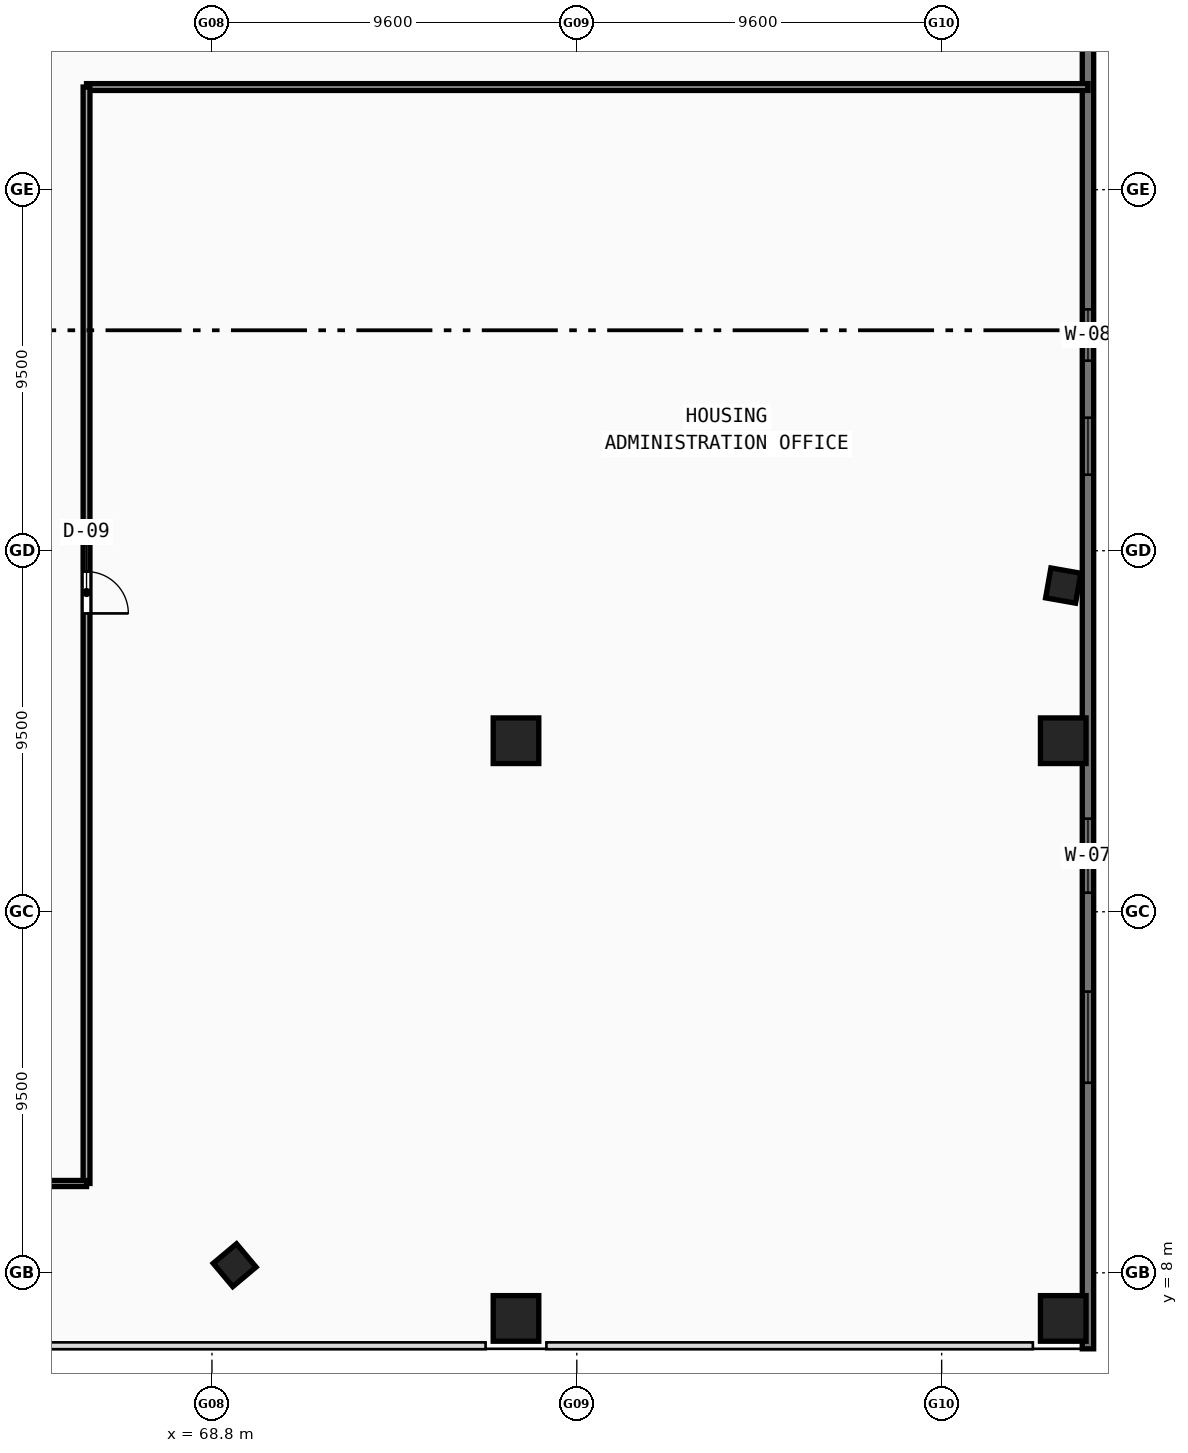
"""IFC4 building model, lengths in metres.
Left out: names, types, materials, properties, quantities, classifications, styles, units other than length and angle.
Written with IfcOpenShell. Run it as: python <this file> out.ifc"""

import sys

from ifc_helpers import new_model, si_unit, direction, frame, frame_2d, origin, origin_with_axes, origin_2d, place, context, subcontext, project, spatial, rectangle, hollow_rectangle, extrude, source, transform, mapped, element, fill, save


model = new_model("IFC4")
c1 = context("Model", 3, precision=1e-05, world=origin(), true_north=direction((0.0, 1.0)))
c2 = subcontext(c1, "Body", "Model", "MODEL_VIEW")
j1 = project(units=[si_unit("LENGTHUNIT", "METRE"), si_unit("PLANEANGLEUNIT", "RADIAN")], contexts=[c1])
p1 = place(None, origin())
s1 = spatial("IfcSite", under=j1, at=p1, CompositionType="ELEMENT")
p2 = place(p1, origin())
s2 = spatial("IfcBuilding", under=s1, at=p2, CompositionType="ELEMENT")
p3 = place(p2, frame((0.0, 0.0, 14.4)))
s3 = spatial("IfcBuildingStorey", under=s2, at=p3, CompositionType="ELEMENT", Elevation=14.4)
m1 = source(origin(), c2, "Body", "SweptSolid", [
    extrude(hollow_rectangle(XDim=1.2, YDim=1.2, WallThickness=0.05, at=origin_2d()), origin(), (0.0, 0.0, 1.0), 4.8),
])
for number, where, z_axis, x_axis in (
    (1, (76.8, 6.8, -0.28), (0.0, 0.0, 1.0), (1.0, 0.0, 0.0)),
    (2, (76.8, 22.0, -0.28), (0.0, 0.0, 1.0), (1.0, 0.0, 0.0)),
    (3, (91.2, 6.8, -0.28), (0.0, 0.0, 1.0), (1.0, 0.0, 0.0)),
    (4, (91.2, 22.0, -0.28), (0.0, 0.0, 1.0), (1.0, 0.0, 0.0)),
):
    element("IfcColumn", number, at=place(p3, frame(where, z_axis=z_axis, x_axis=x_axis)), inside=s3, PredefinedType="COLUMN", context=c2, shape_type="MappedRepresentation", body=[
        mapped(m1, transform((0.0, 0.0, 0.0), scale=1.0)),
    ])
m2 = source(origin(), c2, "Body", "SweptSolid", [
    extrude(hollow_rectangle(XDim=0.8, YDim=0.8, WallThickness=0.032, at=origin_2d()), origin(), (0.0, 0.0, 1.0), 4.8),
])
for number, where, z_axis, x_axis in (
    (5, (69.397, 8.2, -0.28), (0.0, 0.0, 1.0), (0.766, 0.643, 0.0)),
    (6, (91.199, 26.083, -0.28), (0.0, 0.0, 1.0), (0.174, 0.985, 0.0)),
):
    element("IfcColumn", number, at=place(p3, frame(where, z_axis=z_axis, x_axis=x_axis)), inside=s3, PredefinedType="COLUMN", context=c2, shape_type="MappedRepresentation", body=[
        mapped(m2, transform((0.0, 0.0, 0.0), scale=1.0)),
    ])
p4 = place(p3, frame((91.85, 6.0, 0.0), z_axis=(0.0, 0.0, 1.0), x_axis=(0.0, 1.0, 0.0)))
e7 = element("IfcWall", 7, at=p4, inside=s3, PredefinedType="STANDARD", context=c2, shape_type="SweptSolid", body=[
    extrude(rectangle(XDim=76.0, YDim=0.3, at=frame_2d((38.0, 0.0))), origin(), (0.0, 0.0, 1.0), 4.52),
])
p5 = place(p4, frame((7.0, 0.0, 0.9)))
e8 = element("IfcOpeningElement", 8, at=p5, cuts=e7, PredefinedType="OPENING", context=c2, shape_type="SweptSolid", body=[
    extrude(rectangle(XDim=2.4, YDim=1.8, at=frame_2d((1.2, 0.9))), frame((0.0, 0.16, 0.0), z_axis=(0.0, -1.0, 0.0), x_axis=(1.0, 0.0, 0.0)), (0.0, 0.0, 1.0), 0.32),
])
p6 = place(p4, frame((23.0, 0.0, 0.9)))
e9 = element("IfcOpeningElement", 9, at=p6, cuts=e7, PredefinedType="OPENING", context=c2, shape_type="SweptSolid", body=[
    extrude(rectangle(XDim=1.5, YDim=1.6, at=frame_2d((0.75, 0.8))), frame((0.0, 0.16, 0.0), z_axis=(0.0, -1.0, 0.0), x_axis=(1.0, 0.0, 0.0)), (0.0, 0.0, 1.0), 0.32),
])
p7 = place(p4, frame((43.0, 0.0, 0.9)))
e10 = element("IfcOpeningElement", 10, at=p7, cuts=e7, PredefinedType="OPENING", context=c2, shape_type="SweptSolid", body=[
    extrude(rectangle(XDim=2.4, YDim=1.8, at=frame_2d((1.2, 0.9))), frame((0.0, 0.16, 0.0), z_axis=(0.0, -1.0, 0.0), x_axis=(1.0, 0.0, 0.0)), (0.0, 0.0, 1.0), 0.32),
])
p8 = place(p4, frame((63.0, 0.0, 0.9)))
e11 = element("IfcOpeningElement", 11, at=p8, cuts=e7, PredefinedType="OPENING", context=c2, shape_type="SweptSolid", body=[
    extrude(rectangle(XDim=1.5, YDim=1.6, at=frame_2d((0.75, 0.8))), frame((0.0, 0.16, 0.0), z_axis=(0.0, -1.0, 0.0), x_axis=(1.0, 0.0, 0.0)), (0.0, 0.0, 1.0), 0.32),
])
p9 = place(p4, frame((12.0, 0.0, 0.95)))
e12 = element("IfcOpeningElement", 12, at=p9, cuts=e7, PredefinedType="OPENING", context=c2, shape_type="SweptSolid", body=[
    extrude(rectangle(XDim=1.95, YDim=1.75, at=frame_2d((0.975, 0.875))), frame((0.0, 0.16, 0.0), z_axis=(0.0, -1.0, 0.0), x_axis=(1.0, 0.0, 0.0)), (0.0, 0.0, 1.0), 0.32),
])
p10 = place(p4, frame((26.0, 0.0, 0.95)))
e13 = element("IfcOpeningElement", 13, at=p10, cuts=e7, PredefinedType="OPENING", context=c2, shape_type="SweptSolid", body=[
    extrude(rectangle(XDim=1.35, YDim=1.55, at=frame_2d((0.675, 0.775))), frame((0.0, 0.16, 0.0), z_axis=(0.0, -1.0, 0.0), x_axis=(1.0, 0.0, 0.0)), (0.0, 0.0, 1.0), 0.32),
])
p11 = place(p3, frame((65.5, 39.2, 0.0), z_axis=(0.0, 0.0, 1.0), x_axis=(1.0, 0.0, 0.0)))
e14 = element("IfcWall", 14, at=p11, inside=s3, PredefinedType="PARTITIONING", context=c2, shape_type="SweptSolid", body=[
    extrude(rectangle(XDim=26.35, YDim=0.18, at=frame_2d((13.175, 0.0))), origin(), (0.0, 0.0, 1.0), 3.62),
])
p12 = place(p3, frame((65.5, 10.35, 0.0), z_axis=(0.0, 0.0, 1.0), x_axis=(0.0, 1.0, 0.0)))
e15 = element("IfcWall", 15, at=p12, inside=s3, PredefinedType="PARTITIONING", context=c2, shape_type="SweptSolid", body=[
    extrude(rectangle(XDim=28.85, YDim=0.18, at=frame_2d((14.425, 0.0))), origin(), (0.0, 0.0, 1.0), 3.62),
])
p13 = place(p12, frame((15.0, 0.0, 0.0)))
e16 = element("IfcOpeningElement", 16, at=p13, cuts=e15, PredefinedType="OPENING", context=c2, shape_type="SweptSolid", body=[
    extrude(rectangle(XDim=1.1, YDim=2.15, at=frame_2d((0.55, 1.075))), frame((0.0, 0.1, 0.0), z_axis=(0.0, -1.0, 0.0), x_axis=(1.0, 0.0, 0.0)), (0.0, 0.0, 1.0), 0.2),
])
p14 = place(p3, frame((30.5, 10.35, 0.0), z_axis=(0.0, 0.0, 1.0), x_axis=(1.0, 0.0, 0.0)))
e17 = element("IfcWall", 17, at=p14, inside=s3, PredefinedType="PARTITIONING", context=c2, shape_type="SweptSolid", body=[
    extrude(rectangle(XDim=35.0, YDim=0.16, at=frame_2d((17.5, 0.0))), origin(), (0.0, 0.0, 1.0), 3.62),
])
m3 = source(origin(), c2, "Body", "SweptSolid", [
    extrude(rectangle(XDim=2.4, YDim=1.8, at=frame_2d((1.2, 0.9))), frame((0.0, 0.03, 0.0), z_axis=(0.0, -1.0, 0.0), x_axis=(1.0, 0.0, 0.0)), (0.0, 0.0, 1.0), 0.06),
])
p15 = place(p5, origin_with_axes())
e18 = element("IfcWindow", 18, at=p15, inside=s3, PartitioningType="SINGLE_PANEL", PredefinedType="WINDOW", context=c2, shape_type="MappedRepresentation", body=[
    mapped(m3, transform((0.0, 0.0, 0.0), scale=1.0)),
])
fill(e8, e18)
m4 = source(origin(), c2, "Body", "SweptSolid", [
    extrude(rectangle(XDim=1.5, YDim=1.6, at=frame_2d((0.75, 0.8))), frame((0.0, 0.03, 0.0), z_axis=(0.0, -1.0, 0.0), x_axis=(1.0, 0.0, 0.0)), (0.0, 0.0, 1.0), 0.06),
])
p16 = place(p6, origin_with_axes())
e19 = element("IfcWindow", 19, at=p16, inside=s3, PartitioningType="SINGLE_PANEL", PredefinedType="WINDOW", context=c2, shape_type="MappedRepresentation", body=[
    mapped(m4, transform((0.0, 0.0, 0.0), scale=1.0)),
])
fill(e9, e19)
m5 = source(origin(), c2, "Body", "SweptSolid", [
    extrude(rectangle(XDim=1.1, YDim=2.15, at=frame_2d((0.55, 1.075))), frame((0.0, 0.025, 0.0), z_axis=(0.0, -1.0, 0.0), x_axis=(1.0, 0.0, 0.0)), (0.0, 0.0, 1.0), 0.05),
])
p17 = place(p13, frame((1.1, 0.0, 0.0), z_axis=(0.0, 0.0, 1.0), x_axis=(-1.0, 0.0, 0.0)))
e20 = element("IfcDoor", 20, at=p17, inside=s3, OperationType="SINGLE_SWING_RIGHT", PredefinedType="DOOR", context=c2, shape_type="MappedRepresentation", body=[
    mapped(m5, transform((0.0, 0.0, 0.0), scale=1.0)),
])
fill(e16, e20)
m6 = source(origin(), c2, "Body", "SweptSolid", [
    extrude(rectangle(XDim=1.95, YDim=1.75, at=frame_2d((0.975, 0.875))), frame((0.0, 0.03, 0.0), z_axis=(0.0, -1.0, 0.0), x_axis=(1.0, 0.0, 0.0)), (0.0, 0.0, 1.0), 0.06),
])
p18 = place(p9, origin_with_axes())
e21 = element("IfcWindow", 21, at=p18, inside=s3, PartitioningType="SINGLE_PANEL", PredefinedType="WINDOW", context=c2, shape_type="MappedRepresentation", body=[
    mapped(m6, transform((0.0, 0.0, 0.0), scale=1.0)),
])
fill(e12, e21)
m7 = source(origin(), c2, "Body", "SweptSolid", [
    extrude(rectangle(XDim=1.35, YDim=1.55, at=frame_2d((0.675, 0.775))), frame((0.0, 0.03, 0.0), z_axis=(0.0, -1.0, 0.0), x_axis=(1.0, 0.0, 0.0)), (0.0, 0.0, 1.0), 0.06),
])
p19 = place(p10, origin_with_axes())
e22 = element("IfcWindow", 22, at=p19, inside=s3, PartitioningType="SINGLE_PANEL", PredefinedType="WINDOW", context=c2, shape_type="MappedRepresentation", body=[
    mapped(m7, transform((0.0, 0.0, 0.0), scale=1.0)),
])
fill(e13, e22)
save(model, sys.argv[1])
